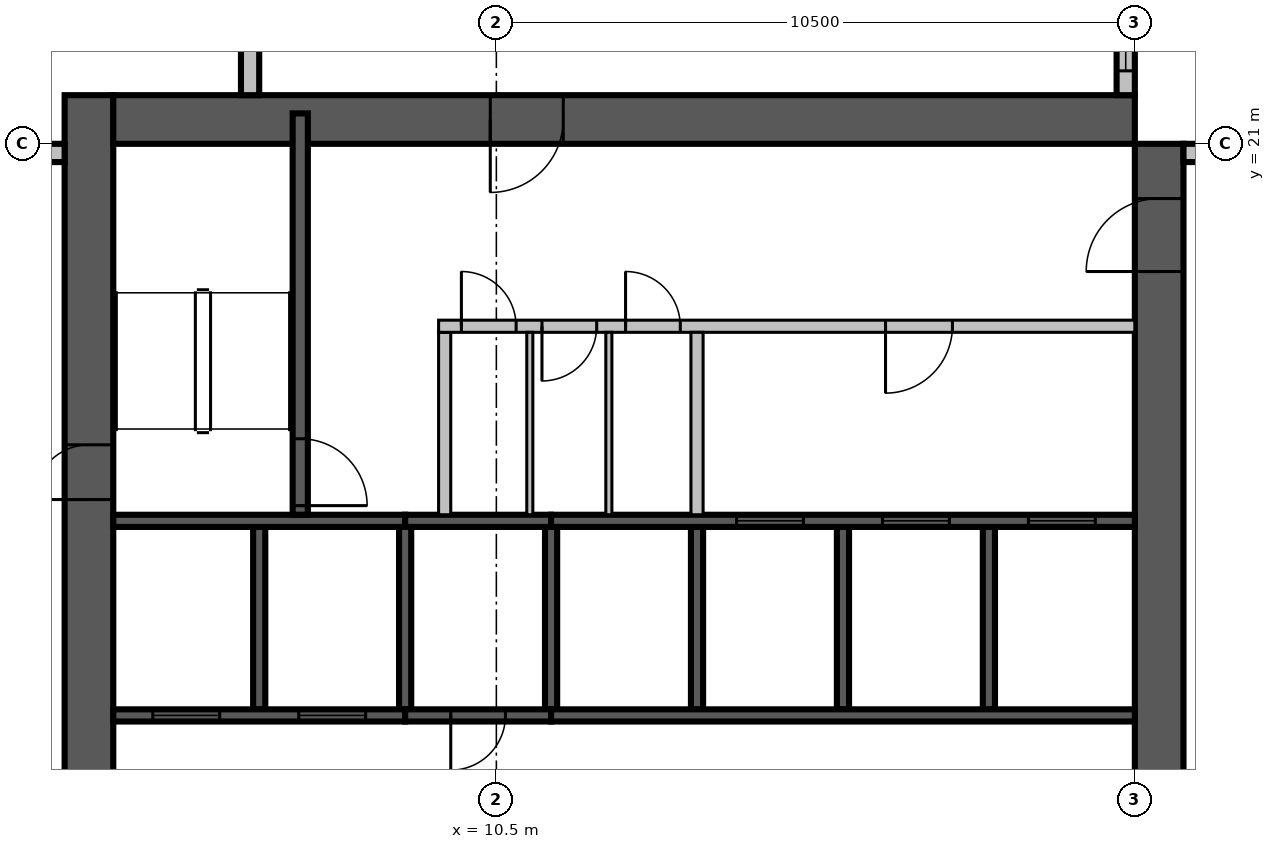
"""IFC4 building model, lengths in metres.
Left out: names, types, materials, properties, quantities, classifications, styles, units other than length and angle.
Written with IfcOpenShell. Run it as: python <this file> out.ifc"""

import sys

from ifc_helpers import new_model, si_unit, direction, frame, frame_2d, origin, place, context, subcontext, project, spatial, rectangle, extrude, source, transform, mapped, element, fill, save


model = new_model("IFC4")
c1 = context("Model", 3, precision=1e-05, world=origin(), true_north=direction((0.0, 1.0)))
c2 = subcontext(c1, "Body", "Model", "MODEL_VIEW")
j1 = project(units=[si_unit("LENGTHUNIT", "METRE"), si_unit("PLANEANGLEUNIT", "RADIAN")], contexts=[c1])
p1 = place(None, origin())
s1 = spatial("IfcSite", under=j1, at=p1, CompositionType="ELEMENT")
p2 = place(p1, origin())
s2 = spatial("IfcBuilding", under=s1, at=p2, CompositionType="ELEMENT")
p3 = place(p2, frame((0.0, 0.0, 223.4)))
s3 = spatial("IfcBuildingStorey", under=s2, at=p3, CompositionType="ELEMENT", Elevation=223.4)
m1 = source(origin(), c2, "Body", "SweptSolid", [
    extrude(rectangle(XDim=17.6, YDim=0.8, at=frame_2d((8.8, 0.0))), origin(), (0.0, 0.0, 1.0), 3.8),
])
p4 = place(p3, frame((3.8, 4.2, 0.0), z_axis=(0.0, 0.0, 1.0), x_axis=(0.0, 1.0, 0.0)))
e1 = element("IfcWall", 1, at=p4, inside=s3, PredefinedType="SHEAR", context=c2, shape_type="MappedRepresentation", body=[
    mapped(m1, transform((0.0, 0.0, 0.0), scale=1.0)),
])
m2 = source(origin(), c2, "Body", "SweptSolid", [
    extrude(rectangle(XDim=2.2, YDim=2.1, at=frame_2d((1.1, 1.05))), frame((0.0, 0.41, 0.0), z_axis=(0.0, -1.0, 0.0), x_axis=(1.0, 0.0, 0.0)), (0.0, 0.0, 1.0), 0.82),
])
p5 = place(p4, frame((4.2, 0.0, 0.0)))
e2 = element("IfcOpeningElement", 2, at=p5, cuts=e1, PredefinedType="OPENING", context=c2, shape_type="MappedRepresentation", body=[
    mapped(m2, transform((0.0, 0.0, 0.0), scale=1.0)),
])
m3 = source(origin(), c2, "Body", "SweptSolid", [
    extrude(rectangle(XDim=0.9, YDim=2.1, at=frame_2d((0.45, 1.05))), frame((0.0, 0.41, 0.0), z_axis=(0.0, -1.0, 0.0), x_axis=(1.0, 0.0, 0.0)), (0.0, 0.0, 1.0), 0.82),
])
p6 = place(p4, frame((10.95, 0.0, 0.0)))
e3 = element("IfcOpeningElement", 3, at=p6, cuts=e1, PredefinedType="OPENING", context=c2, shape_type="MappedRepresentation", body=[
    mapped(m3, transform((0.0, 0.0, 0.0), scale=1.0)),
])
m4 = source(origin(), c2, "Body", "SweptSolid", [
    extrude(rectangle(XDim=16.8, YDim=0.8, at=frame_2d((8.4, 0.0))), origin(), (0.0, 0.0, 1.0), 3.8),
])
p7 = place(p3, frame((21.4, 4.2, 0.0), z_axis=(0.0, 0.0, 1.0), x_axis=(0.0, 1.0, 0.0)))
e4 = element("IfcWall", 4, at=p7, inside=s3, PredefinedType="SHEAR", context=c2, shape_type="MappedRepresentation", body=[
    mapped(m4, transform((0.0, 0.0, 0.0), scale=1.0)),
])
p8 = place(p7, frame((4.2, 0.0, 0.0)))
e5 = element("IfcOpeningElement", 5, at=p8, cuts=e4, PredefinedType="OPENING", context=c2, shape_type="MappedRepresentation", body=[
    mapped(m2, transform((0.0, 0.0, 0.0), scale=1.0)),
])
m5 = source(origin(), c2, "Body", "SweptSolid", [
    extrude(rectangle(XDim=1.2, YDim=2.1, at=frame_2d((0.6, 1.05))), frame((0.0, 0.41, 0.0), z_axis=(0.0, -1.0, 0.0), x_axis=(1.0, 0.0, 0.0)), (0.0, 0.0, 1.0), 0.82),
])
p9 = place(p7, frame((14.7, 0.0, 0.0)))
e6 = element("IfcOpeningElement", 6, at=p9, cuts=e4, PredefinedType="OPENING", context=c2, shape_type="MappedRepresentation", body=[
    mapped(m5, transform((0.0, 0.0, 0.0), scale=1.0)),
])
p10 = place(p3, frame((4.2, 21.4, 0.0), z_axis=(0.0, 0.0, 1.0), x_axis=(1.0, 0.0, 0.0)))
e7 = element("IfcWall", 7, at=p10, inside=s3, PredefinedType="SHEAR", context=c2, shape_type="MappedRepresentation", body=[
    mapped(m4, transform((0.0, 0.0, 0.0), scale=1.0)),
])
p11 = place(p10, frame((6.2, 0.0, 0.0)))
e8 = element("IfcOpeningElement", 8, at=p11, cuts=e7, PredefinedType="OPENING", context=c2, shape_type="MappedRepresentation", body=[
    mapped(m5, transform((0.0, 0.0, 0.0), scale=1.0)),
])
m6 = source(origin(), c2, "Body", "SweptSolid", [
    extrude(rectangle(XDim=7.15, YDim=0.3, at=frame_2d((3.575, 0.0))), origin(), (0.0, 0.0, 1.0), 3.4),
])
p12 = place(p3, frame((28.95, 20.85, 0.0), z_axis=(0.0, 0.0, 1.0), x_axis=(-1.0, 0.0, 0.0)))
e9 = element("IfcWall", 9, at=p12, inside=s3, PredefinedType="STANDARD", context=c2, shape_type="MappedRepresentation", body=[
    mapped(m6, transform((0.0, 0.0, 0.0), scale=1.0)),
])
m7 = source(origin(), c2, "Body", "SweptSolid", [
    extrude(rectangle(XDim=3.0, YDim=2.3, at=frame_2d((1.5, 1.15))), frame((0.0, 0.16, 0.0), z_axis=(0.0, -1.0, 0.0), x_axis=(1.0, 0.0, 0.0)), (0.0, 0.0, 1.0), 0.32),
])
p13 = place(p12, frame((0.15, 0.0, 0.6)))
e10 = element("IfcOpeningElement", 10, at=p13, cuts=e9, PredefinedType="OPENING", context=c2, shape_type="MappedRepresentation", body=[
    mapped(m7, transform((0.0, 0.0, 0.0), scale=1.0)),
])
m8 = source(origin(), c2, "Body", "SweptSolid", [
    extrude(rectangle(XDim=1.8, YDim=2.3, at=frame_2d((0.9, 1.15))), frame((0.0, 0.16, 0.0), z_axis=(0.0, -1.0, 0.0), x_axis=(1.0, 0.0, 0.0)), (0.0, 0.0, 1.0), 0.32),
])
p14 = place(p12, frame((4.95, 0.0, 0.6)))
e11 = element("IfcOpeningElement", 11, at=p14, cuts=e9, PredefinedType="OPENING", context=c2, shape_type="MappedRepresentation", body=[
    mapped(m8, transform((0.0, 0.0, 0.0), scale=1.0)),
])
p15 = place(p3, frame((20.85, 21.8, 0.0), z_axis=(0.0, 0.0, 1.0), x_axis=(0.0, 1.0, 0.0)))
e12 = element("IfcWall", 12, at=p15, inside=s3, PredefinedType="STANDARD", context=c2, shape_type="MappedRepresentation", body=[
    mapped(m6, transform((0.0, 0.0, 0.0), scale=1.0)),
])
p16 = place(p15, frame((0.4, 0.0, 0.6)))
e13 = element("IfcOpeningElement", 13, at=p16, cuts=e12, PredefinedType="OPENING", context=c2, shape_type="MappedRepresentation", body=[
    mapped(m8, transform((0.0, 0.0, 0.0), scale=1.0)),
])
p17 = place(p15, frame((4.0, 0.0, 0.6)))
e14 = element("IfcOpeningElement", 14, at=p17, cuts=e12, PredefinedType="OPENING", context=c2, shape_type="MappedRepresentation", body=[
    mapped(m7, transform((0.0, 0.0, 0.0), scale=1.0)),
])
m9 = source(origin(), c2, "Body", "SweptSolid", [
    extrude(rectangle(XDim=16.6, YDim=0.3, at=frame_2d((8.3, 0.0))), origin(), (0.0, 0.0, 1.0), 3.4),
])
p18 = place(p3, frame((6.45, 38.4, 0.0), z_axis=(0.0, 0.0, 1.0), x_axis=(0.0, -1.0, 0.0)))
e15 = element("IfcWall", 15, at=p18, inside=s3, PredefinedType="STANDARD", context=c2, shape_type="MappedRepresentation", body=[
    mapped(m9, transform((0.0, 0.0, 0.0), scale=1.0)),
])
p19 = place(p18, frame((1.15, 0.0, 0.6)))
e16 = element("IfcOpeningElement", 16, at=p19, cuts=e15, PredefinedType="OPENING", context=c2, shape_type="MappedRepresentation", body=[
    mapped(m8, transform((0.0, 0.0, 0.0), scale=1.0)),
])
p20 = place(p18, frame((9.438, 0.0, 0.6)))
e17 = element("IfcOpeningElement", 17, at=p20, cuts=e15, PredefinedType="OPENING", context=c2, shape_type="MappedRepresentation", body=[
    mapped(m8, transform((0.0, 0.0, 0.0), scale=1.0)),
])
p21 = place(p18, frame((13.637, 0.0, 0.6)))
e18 = element("IfcOpeningElement", 18, at=p21, cuts=e15, PredefinedType="OPENING", context=c2, shape_type="MappedRepresentation", body=[
    mapped(m8, transform((0.0, 0.0, 0.0), scale=1.0)),
])
m10 = source(origin(), c2, "Body", "SweptSolid", [
    extrude(rectangle(XDim=1.0, YDim=2.1, at=frame_2d((0.5, 1.05))), frame((0.0, 0.16, 0.0), z_axis=(0.0, -1.0, 0.0), x_axis=(1.0, 0.0, 0.0)), (0.0, 0.0, 1.0), 0.32),
])
p22 = place(p18, frame((5.45, 0.0, 0.0)))
e19 = element("IfcOpeningElement", 19, at=p22, cuts=e15, PredefinedType="OPENING", context=c2, shape_type="MappedRepresentation", body=[
    mapped(m10, transform((0.0, 0.0, 0.0), scale=1.0)),
])
m11 = source(origin(), c2, "Body", "SweptSolid", [
    extrude(rectangle(XDim=2.5, YDim=0.3, at=frame_2d((1.25, 0.0))), origin(), (0.0, 0.0, 1.0), 3.4),
])
p23 = place(p3, frame((3.4, 20.85, 0.0), z_axis=(0.0, 0.0, 1.0), x_axis=(-1.0, 0.0, 0.0)))
e20 = element("IfcWall", 20, at=p23, inside=s3, PredefinedType="STANDARD", context=c2, shape_type="MappedRepresentation", body=[
    mapped(m11, transform((0.0, 0.0, 0.0), scale=1.0)),
])
p24 = place(p23, frame((0.4, 0.0, 0.6)))
e21 = element("IfcOpeningElement", 21, at=p24, cuts=e20, PredefinedType="OPENING", context=c2, shape_type="MappedRepresentation", body=[
    mapped(m8, transform((0.0, 0.0, 0.0), scale=1.0)),
])
m12 = source(origin(), c2, "Body", "SweptSolid", [
    extrude(rectangle(XDim=3.0, YDim=0.2, at=frame_2d((1.5, 0.0))), origin(), (0.0, 0.0, 1.0), 3.8),
])
p25 = place(p3, frame((6.6, 11.7, 0.0), z_axis=(0.0, 0.0, 1.0), x_axis=(0.0, 1.0, 0.0)))
e22 = element("IfcWall", 22, at=p25, inside=s3, PredefinedType="SOLIDWALL", context=c2, shape_type="MappedRepresentation", body=[
    mapped(m12, transform((0.0, 0.0, 0.0), scale=1.0)),
])
m13 = source(origin(), c2, "Body", "SweptSolid", [
    extrude(rectangle(XDim=3.0, YDim=0.2, at=frame_2d((1.5, 0.0))), origin(), (0.0, 0.0, 1.0), 3.4),
])
for number, where, z_axis, x_axis in (
    (23, (9.0, 11.7, 0.0), (0.0, 0.0, 1.0), (0.0, 1.0, 0.0)),
    (24, (11.4, 11.7, 0.0), (0.0, 0.0, 1.0), (0.0, 1.0, 0.0)),
):
    element("IfcWall", number, at=place(p3, frame(where, z_axis=z_axis, x_axis=x_axis)), inside=s3, PredefinedType="SOLIDWALL", context=c2, shape_type="MappedRepresentation", body=[
        mapped(m13, transform((0.0, 0.0, 0.0), scale=1.0)),
    ])
for number, where, z_axis, x_axis in (
    (25, (13.8, 11.7, 0.0), (0.0, 0.0, 1.0), (0.0, 1.0, 0.0)),
    (26, (16.2, 11.7, 0.0), (0.0, 0.0, 1.0), (0.0, 1.0, 0.0)),
    (27, (18.6, 11.7, 0.0), (0.0, 0.0, 1.0), (0.0, 1.0, 0.0)),
):
    element("IfcWall", number, at=place(p3, frame(where, z_axis=z_axis, x_axis=x_axis)), inside=s3, PredefinedType="SOLIDWALL", context=c2, shape_type="MappedRepresentation", body=[
        mapped(m12, transform((0.0, 0.0, 0.0), scale=1.0)),
    ])
m14 = source(origin(), c2, "Body", "SweptSolid", [
    extrude(rectangle(XDim=4.8, YDim=0.2, at=frame_2d((2.4, 0.0))), origin(), (0.0, 0.0, 1.0), 3.8),
])
p26 = place(p3, frame((4.2, 11.6, 0.0), z_axis=(0.0, 0.0, 1.0), x_axis=(1.0, 0.0, 0.0)))
e28 = element("IfcWall", 28, at=p26, inside=s3, PredefinedType="SOLIDWALL", context=c2, shape_type="MappedRepresentation", body=[
    mapped(m14, transform((0.0, 0.0, 0.0), scale=1.0)),
])
m15 = source(origin(), c2, "Body", "SweptSolid", [
    extrude(rectangle(XDim=1.1, YDim=2.1, at=frame_2d((0.55, 1.05))), frame((0.0, 0.11, 0.0), z_axis=(0.0, -1.0, 0.0), x_axis=(1.0, 0.0, 0.0)), (0.0, 0.0, 1.0), 0.22),
])
p27 = place(p26, frame((0.65, 0.0, 0.0)))
e29 = element("IfcOpeningElement", 29, at=p27, cuts=e28, PredefinedType="OPENING", context=c2, shape_type="MappedRepresentation", body=[
    mapped(m15, transform((0.0, 0.0, 0.0), scale=1.0)),
])
p28 = place(p26, frame((3.05, 0.0, 0.0)))
e30 = element("IfcOpeningElement", 30, at=p28, cuts=e28, PredefinedType="OPENING", context=c2, shape_type="MappedRepresentation", body=[
    mapped(m15, transform((0.0, 0.0, 0.0), scale=1.0)),
])
m16 = source(origin(), c2, "Body", "SweptSolid", [
    extrude(rectangle(XDim=2.4, YDim=0.2, at=frame_2d((1.2, 0.0))), origin(), (0.0, 0.0, 1.0), 3.4),
])
p29 = place(p3, frame((9.0, 11.6, 0.0), z_axis=(0.0, 0.0, 1.0), x_axis=(1.0, 0.0, 0.0)))
e31 = element("IfcWall", 31, at=p29, inside=s3, PredefinedType="SOLIDWALL", context=c2, shape_type="MappedRepresentation", body=[
    mapped(m16, transform((0.0, 0.0, 0.0), scale=1.0)),
])
m17 = source(origin(), c2, "Body", "SweptSolid", [
    extrude(rectangle(XDim=0.9, YDim=2.1, at=frame_2d((0.45, 1.05))), frame((0.0, 0.11, 0.0), z_axis=(0.0, -1.0, 0.0), x_axis=(1.0, 0.0, 0.0)), (0.0, 0.0, 1.0), 0.22),
])
p30 = place(p29, frame((0.75, 0.0, 0.0)))
e32 = element("IfcOpeningElement", 32, at=p30, cuts=e31, PredefinedType="OPENING", context=c2, shape_type="MappedRepresentation", body=[
    mapped(m17, transform((0.0, 0.0, 0.0), scale=1.0)),
])
m18 = source(origin(), c2, "Body", "SweptSolid", [
    extrude(rectangle(XDim=9.6, YDim=0.2, at=frame_2d((4.8, 0.0))), origin(), (0.0, 0.0, 1.0), 3.8),
])
p31 = place(p3, frame((11.4, 11.6, 0.0), z_axis=(0.0, 0.0, 1.0), x_axis=(1.0, 0.0, 0.0)))
e33 = element("IfcWall", 33, at=p31, inside=s3, PredefinedType="SOLIDWALL", context=c2, shape_type="MappedRepresentation", body=[
    mapped(m18, transform((0.0, 0.0, 0.0), scale=1.0)),
])
p32 = place(p3, frame((4.2, 14.8, 0.0), z_axis=(0.0, 0.0, 1.0), x_axis=(1.0, 0.0, 0.0)))
e34 = element("IfcWall", 34, at=p32, inside=s3, PredefinedType="SOLIDWALL", context=c2, shape_type="MappedRepresentation", body=[
    mapped(m14, transform((0.0, 0.0, 0.0), scale=1.0)),
])
p33 = place(p3, frame((9.0, 14.8, 0.0), z_axis=(0.0, 0.0, 1.0), x_axis=(1.0, 0.0, 0.0)))
e35 = element("IfcWall", 35, at=p33, inside=s3, PredefinedType="SOLIDWALL", context=c2, shape_type="MappedRepresentation", body=[
    mapped(m16, transform((0.0, 0.0, 0.0), scale=1.0)),
])
p34 = place(p3, frame((11.4, 14.8, 0.0), z_axis=(0.0, 0.0, 1.0), x_axis=(1.0, 0.0, 0.0)))
e36 = element("IfcWall", 36, at=p34, inside=s3, PredefinedType="SOLIDWALL", context=c2, shape_type="MappedRepresentation", body=[
    mapped(m18, transform((0.0, 0.0, 0.0), scale=1.0)),
])
p35 = place(p34, frame((3.05, 0.0, 0.0)))
e37 = element("IfcOpeningElement", 37, at=p35, cuts=e36, PredefinedType="OPENING", context=c2, shape_type="MappedRepresentation", body=[
    mapped(m15, transform((0.0, 0.0, 0.0), scale=1.0)),
])
p36 = place(p34, frame((5.45, 0.0, 0.0)))
e38 = element("IfcOpeningElement", 38, at=p36, cuts=e36, PredefinedType="OPENING", context=c2, shape_type="MappedRepresentation", body=[
    mapped(m15, transform((0.0, 0.0, 0.0), scale=1.0)),
])
p37 = place(p34, frame((7.85, 0.0, 0.0)))
e39 = element("IfcOpeningElement", 39, at=p37, cuts=e36, PredefinedType="OPENING", context=c2, shape_type="MappedRepresentation", body=[
    mapped(m15, transform((0.0, 0.0, 0.0), scale=1.0)),
])
m19 = source(origin(), c2, "Body", "SweptSolid", [
    extrude(rectangle(XDim=6.6, YDim=0.25, at=frame_2d((3.3, 0.0))), origin(), (0.0, 0.0, 1.0), 3.4),
])
p38 = place(p3, frame((7.275, 14.9, 0.0), z_axis=(0.0, 0.0, 1.0), x_axis=(0.0, 1.0, 0.0)))
e40 = element("IfcWall", 40, at=p38, inside=s3, PredefinedType="SOLIDWALL", context=c2, shape_type="MappedRepresentation", body=[
    mapped(m19, transform((0.0, 0.0, 0.0), scale=1.0)),
])
m20 = source(origin(), c2, "Body", "SweptSolid", [
    extrude(rectangle(XDim=1.1, YDim=2.1, at=frame_2d((0.55, 1.05))), frame((0.0, 0.135, 0.0), z_axis=(0.0, -1.0, 0.0), x_axis=(1.0, 0.0, 0.0)), (0.0, 0.0, 1.0), 0.27),
])
p39 = place(p38, frame((0.15, 0.0, 0.0)))
e41 = element("IfcOpeningElement", 41, at=p39, cuts=e40, PredefinedType="OPENING", context=c2, shape_type="MappedRepresentation", body=[
    mapped(m20, transform((0.0, 0.0, 0.0), scale=1.0)),
])
m21 = source(origin(), c2, "Body", "SweptSolid", [
    extrude(rectangle(XDim=3.0, YDim=0.2, at=frame_2d((1.5, 0.0))), origin(), (0.0, 0.0, 1.0), 3.4),
])
p40 = place(p3, frame((9.65, 14.9, 0.0), z_axis=(0.0, 0.0, 1.0), x_axis=(0.0, 1.0, 0.0)))
e42 = element("IfcWall", 42, at=p40, inside=s3, PredefinedType="PARTITIONING", context=c2, shape_type="MappedRepresentation", body=[
    mapped(m21, transform((0.0, 0.0, 0.0), scale=1.0)),
])
m22 = source(origin(), c2, "Body", "SweptSolid", [
    extrude(rectangle(XDim=11.45, YDim=0.2, at=frame_2d((5.725, 0.0))), origin(), (0.0, 0.0, 1.0), 3.4),
])
p41 = place(p3, frame((9.55, 18.0, 0.0), z_axis=(0.0, 0.0, 1.0), x_axis=(1.0, 0.0, 0.0)))
e43 = element("IfcWall", 43, at=p41, inside=s3, PredefinedType="PARTITIONING", context=c2, shape_type="MappedRepresentation", body=[
    mapped(m22, transform((0.0, 0.0, 0.0), scale=1.0)),
])
p42 = place(p41, frame((0.375, 0.0, 0.0)))
e44 = element("IfcOpeningElement", 44, at=p42, cuts=e43, PredefinedType="OPENING", context=c2, shape_type="MappedRepresentation", body=[
    mapped(m17, transform((0.0, 0.0, 0.0), scale=1.0)),
])
p43 = place(p41, frame((1.7, 0.0, 0.0)))
e45 = element("IfcOpeningElement", 45, at=p43, cuts=e43, PredefinedType="OPENING", context=c2, shape_type="MappedRepresentation", body=[
    mapped(m17, transform((0.0, 0.0, 0.0), scale=1.0)),
])
p44 = place(p41, frame((3.075, 0.0, 0.0)))
e46 = element("IfcOpeningElement", 46, at=p44, cuts=e43, PredefinedType="OPENING", context=c2, shape_type="MappedRepresentation", body=[
    mapped(m17, transform((0.0, 0.0, 0.0), scale=1.0)),
])
p45 = place(p41, frame((7.35, 0.0, 0.0)))
e47 = element("IfcOpeningElement", 47, at=p45, cuts=e43, PredefinedType="OPENING", context=c2, shape_type="MappedRepresentation", body=[
    mapped(m15, transform((0.0, 0.0, 0.0), scale=1.0)),
])
p46 = place(p3, frame((13.8, 14.9, 0.0), z_axis=(0.0, 0.0, 1.0), x_axis=(0.0, 1.0, 0.0)))
e48 = element("IfcWall", 48, at=p46, inside=s3, PredefinedType="PARTITIONING", context=c2, shape_type="MappedRepresentation", body=[
    mapped(m21, transform((0.0, 0.0, 0.0), scale=1.0)),
])
m23 = source(origin(), c2, "Body", "SweptSolid", [
    extrude(rectangle(XDim=3.0, YDim=0.1, at=frame_2d((1.5, 0.0))), origin(), (0.0, 0.0, 1.0), 3.4),
])
for number, where, z_axis, x_axis in (
    (49, (11.05, 14.9, 0.0), (0.0, 0.0, 1.0), (0.0, 1.0, 0.0)),
    (50, (12.35, 14.9, 0.0), (0.0, 0.0, 1.0), (0.0, 1.0, 0.0)),
):
    element("IfcWall", number, at=place(p3, frame(where, z_axis=z_axis, x_axis=x_axis)), inside=s3, PredefinedType="PARTITIONING", context=c2, shape_type="MappedRepresentation", body=[
        mapped(m23, transform((0.0, 0.0, 0.0), scale=1.0)),
    ])
m24 = source(origin(), c2, "Body", "SweptSolid", [
    extrude(rectangle(XDim=1.8, YDim=2.3, at=frame_2d((0.9, 1.15))), frame((0.0, 0.03, 0.0), z_axis=(0.0, -1.0, 0.0), x_axis=(1.0, 0.0, 0.0)), (0.0, 0.0, 1.0), 0.06),
])
p47 = place(p16, origin())
e51 = element("IfcWindow", 51, at=p47, inside=s3, PartitioningType="SINGLE_PANEL", PredefinedType="WINDOW", context=c2, shape_type="MappedRepresentation", body=[
    mapped(m24, transform((0.0, 0.0, 0.0), scale=1.0)),
])
fill(e13, e51)
m25 = source(origin(), c2, "Body", "SweptSolid", [
    extrude(rectangle(XDim=1.1, YDim=2.1, at=frame_2d((0.55, 1.05))), frame((0.0, 0.025, 0.0), z_axis=(0.0, -1.0, 0.0), x_axis=(1.0, 0.0, 0.0)), (0.0, 0.0, 1.0), 0.05),
])
p48 = place(p27, origin())
e52 = element("IfcDoor", 52, at=p48, inside=s3, OperationType="SLIDING_TO_LEFT", PredefinedType="DOOR", context=c2, shape_type="MappedRepresentation", body=[
    mapped(m25, transform((0.0, 0.0, 0.0), scale=1.0)),
])
fill(e29, e52)
p49 = place(p28, origin())
e53 = element("IfcDoor", 53, at=p49, inside=s3, OperationType="SLIDING_TO_LEFT", PredefinedType="DOOR", context=c2, shape_type="MappedRepresentation", body=[
    mapped(m25, transform((0.0, 0.0, 0.0), scale=1.0)),
])
fill(e30, e53)
m26 = source(origin(), c2, "Body", "SweptSolid", [
    extrude(rectangle(XDim=0.9, YDim=2.1, at=frame_2d((0.45, 1.05))), frame((0.0, 0.025, 0.0), z_axis=(0.0, -1.0, 0.0), x_axis=(1.0, 0.0, 0.0)), (0.0, 0.0, 1.0), 0.05),
])
p50 = place(p30, origin())
e54 = element("IfcDoor", 54, at=p50, inside=s3, OperationType="SINGLE_SWING_RIGHT", PredefinedType="DOOR", context=c2, shape_type="MappedRepresentation", body=[
    mapped(m26, transform((0.0, 0.0, 0.0), scale=1.0)),
])
fill(e32, e54)
p51 = place(p35, origin())
e55 = element("IfcDoor", 55, at=p51, inside=s3, OperationType="SLIDING_TO_LEFT", PredefinedType="DOOR", context=c2, shape_type="MappedRepresentation", body=[
    mapped(m25, transform((0.0, 0.0, 0.0), scale=1.0)),
])
fill(e37, e55)
p52 = place(p36, origin())
e56 = element("IfcDoor", 56, at=p52, inside=s3, OperationType="SLIDING_TO_LEFT", PredefinedType="DOOR", context=c2, shape_type="MappedRepresentation", body=[
    mapped(m25, transform((0.0, 0.0, 0.0), scale=1.0)),
])
fill(e38, e56)
p53 = place(p37, origin())
e57 = element("IfcDoor", 57, at=p53, inside=s3, OperationType="SLIDING_TO_LEFT", PredefinedType="DOOR", context=c2, shape_type="MappedRepresentation", body=[
    mapped(m25, transform((0.0, 0.0, 0.0), scale=1.0)),
])
fill(e39, e57)
p54 = place(p39, origin())
e58 = element("IfcDoor", 58, at=p54, inside=s3, OperationType="SINGLE_SWING_RIGHT", PredefinedType="DOOR", context=c2, shape_type="MappedRepresentation", body=[
    mapped(m25, transform((0.0, 0.0, 0.0), scale=1.0)),
])
fill(e41, e58)
p55 = place(p42, origin())
e59 = element("IfcDoor", 59, at=p55, inside=s3, OperationType="SINGLE_SWING_LEFT", PredefinedType="DOOR", context=c2, shape_type="MappedRepresentation", body=[
    mapped(m26, transform((0.0, 0.0, 0.0), scale=1.0)),
])
fill(e44, e59)
p56 = place(p43, origin())
e60 = element("IfcDoor", 60, at=p56, inside=s3, OperationType="SINGLE_SWING_RIGHT", PredefinedType="DOOR", context=c2, shape_type="MappedRepresentation", body=[
    mapped(m26, transform((0.0, 0.0, 0.0), scale=1.0)),
])
fill(e45, e60)
p57 = place(p44, origin())
e61 = element("IfcDoor", 61, at=p57, inside=s3, OperationType="SINGLE_SWING_LEFT", PredefinedType="DOOR", context=c2, shape_type="MappedRepresentation", body=[
    mapped(m26, transform((0.0, 0.0, 0.0), scale=1.0)),
])
fill(e46, e61)
p58 = place(p45, origin())
e62 = element("IfcDoor", 62, at=p58, inside=s3, OperationType="SINGLE_SWING_RIGHT", PredefinedType="DOOR", context=c2, shape_type="MappedRepresentation", body=[
    mapped(m25, transform((0.0, 0.0, 0.0), scale=1.0)),
])
fill(e47, e62)
m27 = source(origin(), c2, "Body", "SweptSolid", [
    extrude(rectangle(XDim=1.2, YDim=2.1, at=frame_2d((0.6, 1.05))), frame((0.0, 0.025, 0.0), z_axis=(0.0, -1.0, 0.0), x_axis=(1.0, 0.0, 0.0)), (0.0, 0.0, 1.0), 0.05),
])
p59 = place(p11, origin())
e63 = element("IfcDoor", 63, at=p59, inside=s3, OperationType="SINGLE_SWING_RIGHT", PredefinedType="DOOR", context=c2, shape_type="MappedRepresentation", body=[
    mapped(m27, transform((0.0, 0.0, 0.0), scale=1.0)),
])
fill(e8, e63)
p60 = place(p9, origin())
e64 = element("IfcDoor", 64, at=p60, inside=s3, OperationType="SINGLE_SWING_LEFT", PredefinedType="DOOR", context=c2, shape_type="MappedRepresentation", body=[
    mapped(m27, transform((0.0, 0.0, 0.0), scale=1.0)),
])
fill(e6, e64)
p61 = place(p6, origin())
e65 = element("IfcDoor", 65, at=p61, inside=s3, OperationType="SINGLE_SWING_LEFT", PredefinedType="DOOR", context=c2, shape_type="MappedRepresentation", body=[
    mapped(m26, transform((0.0, 0.0, 0.0), scale=1.0)),
])
fill(e3, e65)
save(model, sys.argv[1])
